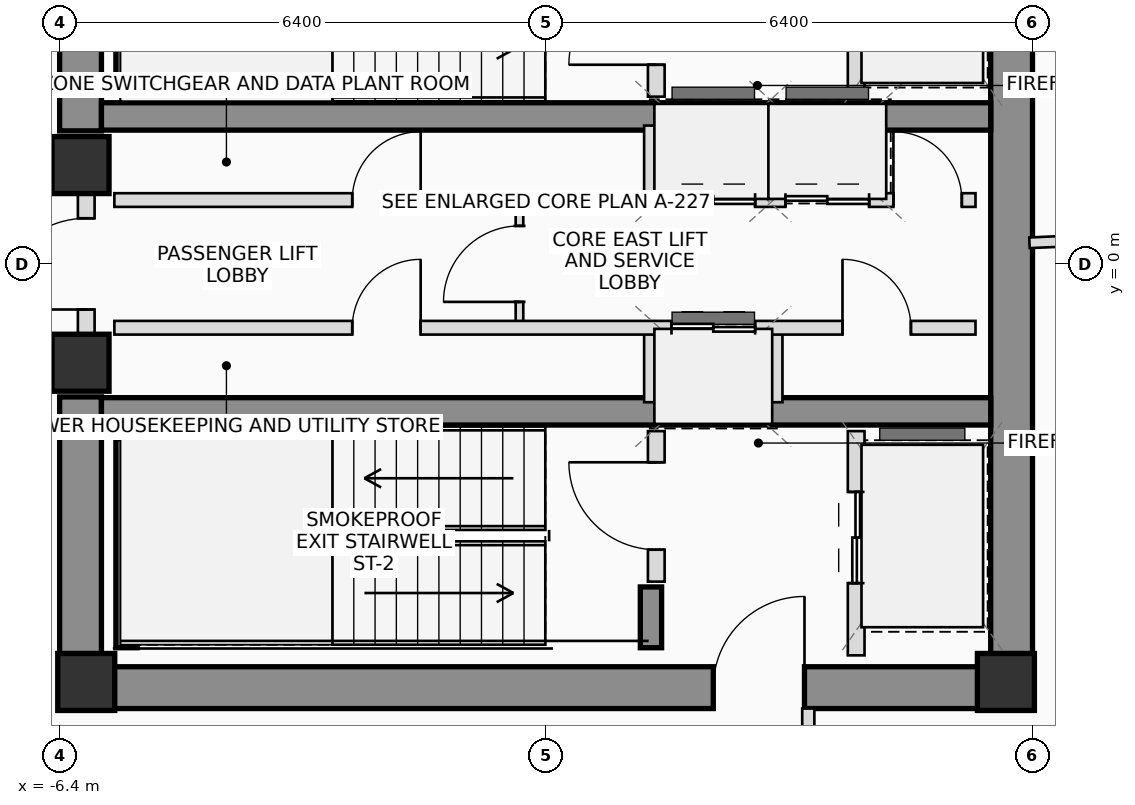
"""IFC4 building model, lengths in metres.
Left out: names, types, materials, properties, quantities, classifications, styles, units other than length and angle.
Written with IfcOpenShell. Run it as: python <this file> out.ifc"""

import sys

from ifc_helpers import new_model, si_unit, direction, frame, frame_2d, origin, origin_2d, place, context, subcontext, project, spatial, rectangle, extrude, source, transform, mapped, element, fill, save


model = new_model("IFC4")
c1 = context("Model", 3, precision=1e-05, world=origin(), true_north=direction((0.0, 1.0)))
c2 = subcontext(c1, "Body", "Model", "MODEL_VIEW")
j1 = project(units=[si_unit("LENGTHUNIT", "METRE"), si_unit("PLANEANGLEUNIT", "RADIAN")], contexts=[c1])
p1 = place(None, origin())
s1 = spatial("IfcSite", under=j1, at=p1, CompositionType="ELEMENT")
p2 = place(p1, origin())
s2 = spatial("IfcBuilding", under=s1, at=p2, CompositionType="ELEMENT")
p3 = place(p2, frame((0.0, 0.0, 300.2)))
s3 = spatial("IfcBuildingStorey", under=s2, at=p3, CompositionType="ELEMENT", Elevation=300.2)
m1 = source(origin(), c2, "Body", "SweptSolid", [
    extrude(rectangle(XDim=0.75, YDim=0.75, at=origin_2d()), origin(), (0.0, 0.0, 1.0), 3.45),
])
for number, where, z_axis, x_axis in (
    (1, (-6.05, -5.5, 0.0), (0.0, 0.0, 1.0), (1.0, 0.0, 0.0)),
    (2, (6.05, -5.5, 0.0), (0.0, 0.0, 1.0), (1.0, 0.0, 0.0)),
):
    element("IfcColumn", number, at=place(p3, frame(where, z_axis=z_axis, x_axis=x_axis)), inside=s3, PredefinedType="COLUMN", context=c2, shape_type="MappedRepresentation", body=[
        mapped(m1, transform((0.0, 0.0, 0.0), scale=1.0)),
    ])
p4 = place(p3, frame((-6.4, -5.575, 0.0), z_axis=(0.0, 0.0, 1.0), x_axis=(1.0, 0.0, 0.0)))
e3 = element("IfcWall", 3, at=p4, inside=s3, PredefinedType="SHEAR", context=c2, shape_type="SweptSolid", body=[
    extrude(rectangle(XDim=12.8, YDim=0.55, at=frame_2d((6.4, 0.0))), origin(), (0.0, 0.0, 1.0), 3.45),
])
p5 = place(p4, frame((8.6, 0.0, 0.0)))
e4 = element("IfcOpeningElement", 4, at=p5, cuts=e3, PredefinedType="OPENING", context=c2, shape_type="SweptSolid", body=[
    extrude(rectangle(XDim=1.2, YDim=2.2, at=frame_2d((0.6, 1.1))), frame((0.0, 0.285, 0.0), z_axis=(0.0, -1.0, 0.0), x_axis=(1.0, 0.0, 0.0)), (0.0, 0.0, 1.0), 0.57),
])
p6 = place(p3, frame((6.125, -5.3, 0.0), z_axis=(0.0, 0.0, 1.0), x_axis=(0.0, 1.0, 0.0)))
e5 = element("IfcWall", 5, at=p6, inside=s3, PredefinedType="SHEAR", context=c2, shape_type="SweptSolid", body=[
    extrude(rectangle(XDim=10.6, YDim=0.55, at=frame_2d((5.3, 0.0))), origin(), (0.0, 0.0, 1.0), 3.45),
])
for number, where, z_axis, x_axis in (
    (6, (-6.125, -5.3, 0.0), (0.0, 0.0, 1.0), (0.0, 1.0, 0.0)),
    (7, (-6.125, 1.75, 0.0), (0.0, 0.0, 1.0), (0.0, 1.0, 0.0)),
):
    element("IfcWall", number, at=place(p3, frame(where, z_axis=z_axis, x_axis=x_axis)), inside=s3, PredefinedType="SHEAR", context=c2, shape_type="SweptSolid", body=[
        extrude(rectangle(XDim=3.55, YDim=0.55, at=frame_2d((1.775, 0.0))), origin(), (0.0, 0.0, 1.0), 3.45),
    ])
for number, where, z_axis, x_axis in (
    (8, (-5.85, 1.94, 0.0), (0.0, 0.0, 1.0), (1.0, 0.0, 0.0)),
    (9, (-5.85, -1.94, 0.0), (0.0, 0.0, 1.0), (1.0, 0.0, 0.0)),
):
    element("IfcWall", number, at=place(p3, frame(where, z_axis=z_axis, x_axis=x_axis)), inside=s3, PredefinedType="SHEAR", context=c2, shape_type="SweptSolid", body=[
        extrude(rectangle(XDim=11.7, YDim=0.36, at=frame_2d((5.85, 0.0))), origin(), (0.0, 0.0, 1.0), 3.45),
    ])
for number, where, z_axis, x_axis in (
    (10, (-5.52, 2.3, 0.0), (0.0, 0.0, 1.0), (0.0, 1.0, 0.0)),
    (11, (-5.52, -5.05, 0.0), (0.0, 0.0, 1.0), (0.0, 1.0, 0.0)),
):
    element("IfcWall", number, at=place(p3, frame(where, z_axis=z_axis, x_axis=x_axis)), inside=s3, PredefinedType="SHEAR", context=c2, shape_type="SweptSolid", body=[
        extrude(rectangle(XDim=2.75, YDim=0.28, at=frame_2d((1.375, 0.0))), origin(), (0.0, 0.0, 1.0), 3.45),
    ])
p7 = place(p3, frame((1.38, -5.05, 0.0), z_axis=(0.0, 0.0, 1.0), x_axis=(0.0, 1.0, 0.0)))
e12 = element("IfcWall", 12, at=p7, inside=s3, PredefinedType="SHEAR", context=c2, shape_type="SweptSolid", body=[
    extrude(rectangle(XDim=0.8, YDim=0.28, at=frame_2d((0.4, 0.0))), origin(), (0.0, 0.0, 1.0), 3.45),
])
for number, where, z_axis, x_axis in (
    (13, (-6.125, -1.3, 0.0), (0.0, 0.0, 1.0), (1.0, 0.0, 0.0)),
    (14, (-6.125, 1.3, 0.0), (0.0, 0.0, 1.0), (1.0, 0.0, 0.0)),
):
    element("IfcColumn", number, at=place(p3, frame(where, z_axis=z_axis, x_axis=x_axis)), inside=s3, PredefinedType="COLUMN", context=c2, shape_type="MappedRepresentation", body=[
        mapped(m1, transform((0.0, 0.0, 0.0), scale=1.0)),
    ])
p8 = place(p3, frame((-6.05, -0.95, 0.0), z_axis=(0.0, 0.0, 1.0), x_axis=(0.0, 1.0, 0.0)))
e15 = element("IfcWall", 15, at=p8, inside=s3, PredefinedType="PLUMBINGWALL", context=c2, shape_type="SweptSolid", body=[
    extrude(rectangle(XDim=1.9, YDim=0.22, at=frame_2d((0.95, 0.0))), origin(), (0.0, 0.0, 1.0), 2.23),
])
p9 = place(p8, frame((0.35, 0.0, 0.0)))
e16 = element("IfcOpeningElement", 16, at=p9, cuts=e15, PredefinedType="OPENING", context=c2, shape_type="SweptSolid", body=[
    extrude(rectangle(XDim=1.2, YDim=2.2, at=frame_2d((0.6, 1.1))), frame((0.0, 0.12, 0.0), z_axis=(0.0, -1.0, 0.0), x_axis=(1.0, 0.0, 0.0)), (0.0, 0.0, 1.0), 0.24),
])
p10 = place(p3, frame((1.45, 2.2, 0.0), z_axis=(0.0, 0.0, 1.0), x_axis=(0.0, 1.0, 0.0)))
e17 = element("IfcWall", 17, at=p10, inside=s3, PredefinedType="PLUMBINGWALL", context=c2, shape_type="SweptSolid", body=[
    extrude(rectangle(XDim=1.98, YDim=0.22, at=frame_2d((0.99, 0.0))), origin(), (0.0, 0.0, 1.0), 3.25),
])
p11 = place(p10, frame((0.42, 0.0, 0.0)))
e18 = element("IfcOpeningElement", 18, at=p11, cuts=e17, PredefinedType="OPENING", context=c2, shape_type="SweptSolid", body=[
    extrude(rectangle(XDim=1.15, YDim=2.15, at=frame_2d((0.575, 1.075))), frame((0.0, 0.12, 0.0), z_axis=(0.0, -1.0, 0.0), x_axis=(1.0, 0.0, 0.0)), (0.0, 0.0, 1.0), 0.24),
])
p12 = place(p3, frame((4.08, 2.2, 0.0), z_axis=(0.0, 0.0, 1.0), x_axis=(0.0, 1.0, 0.0)))
e19 = element("IfcWall", 19, at=p12, inside=s3, PredefinedType="PLUMBINGWALL", context=c2, shape_type="SweptSolid", body=[
    extrude(rectangle(XDim=2.95, YDim=0.22, at=frame_2d((1.475, 0.0))), origin(), (0.0, 0.0, 1.0), 3.25),
])
p13 = place(p12, frame((0.75, 0.0, 0.0)))
e20 = element("IfcOpeningElement", 20, at=p13, cuts=e19, PredefinedType="OPENING", context=c2, shape_type="SweptSolid", body=[
    extrude(rectangle(XDim=1.2, YDim=2.25, at=frame_2d((0.6, 1.125))), frame((0.0, 0.12, 0.0), z_axis=(0.0, -1.0, 0.0), x_axis=(1.0, 0.0, 0.0)), (0.0, 0.0, 1.0), 0.24),
])
p14 = place(p3, frame((1.45, -4.18, 0.0), z_axis=(0.0, 0.0, 1.0), x_axis=(0.0, 1.0, 0.0)))
e21 = element("IfcWall", 21, at=p14, inside=s3, PredefinedType="PLUMBINGWALL", context=c2, shape_type="SweptSolid", body=[
    extrude(rectangle(XDim=1.98, YDim=0.22, at=frame_2d((0.99, 0.0))), origin(), (0.0, 0.0, 1.0), 3.25),
])
p15 = place(p14, frame((0.42, 0.0, 0.0)))
e22 = element("IfcOpeningElement", 22, at=p15, cuts=e21, PredefinedType="OPENING", context=c2, shape_type="SweptSolid", body=[
    extrude(rectangle(XDim=1.15, YDim=2.15, at=frame_2d((0.575, 1.075))), frame((0.0, 0.12, 0.0), z_axis=(0.0, -1.0, 0.0), x_axis=(1.0, 0.0, 0.0)), (0.0, 0.0, 1.0), 0.24),
])
p16 = place(p3, frame((4.08, -5.15, 0.0), z_axis=(0.0, 0.0, 1.0), x_axis=(0.0, 1.0, 0.0)))
e23 = element("IfcWall", 23, at=p16, inside=s3, PredefinedType="PLUMBINGWALL", context=c2, shape_type="SweptSolid", body=[
    extrude(rectangle(XDim=2.95, YDim=0.22, at=frame_2d((1.475, 0.0))), origin(), (0.0, 0.0, 1.0), 3.25),
])
p17 = place(p16, frame((0.95, 0.0, 0.0)))
e24 = element("IfcOpeningElement", 24, at=p17, cuts=e23, PredefinedType="OPENING", context=c2, shape_type="SweptSolid", body=[
    extrude(rectangle(XDim=1.2, YDim=2.25, at=frame_2d((0.6, 1.125))), frame((0.0, 0.12, 0.0), z_axis=(0.0, -1.0, 0.0), x_axis=(1.0, 0.0, 0.0)), (0.0, 0.0, 1.0), 0.24),
])
p18 = place(p3, frame((-0.35, -0.84, 0.0), z_axis=(0.0, 0.0, 1.0), x_axis=(0.0, 1.0, 0.0)))
e25 = element("IfcWall", 25, at=p18, inside=s3, PredefinedType="PARTITIONING", context=c2, shape_type="SweptSolid", body=[
    extrude(rectangle(XDim=1.68, YDim=0.1, at=frame_2d((0.84, 0.0))), origin(), (0.0, 0.0, 1.0), 3.25),
])
p19 = place(p18, frame((0.34, 0.0, 0.0)))
e26 = element("IfcOpeningElement", 26, at=p19, cuts=e25, PredefinedType="OPENING", context=c2, shape_type="SweptSolid", body=[
    extrude(rectangle(XDim=1.0, YDim=2.25, at=frame_2d((0.5, 1.125))), frame((0.0, 0.06, 0.0), z_axis=(0.0, -1.0, 0.0), x_axis=(1.0, 0.0, 0.0)), (0.0, 0.0, 1.0), 0.12),
])
for number, where, z_axis, x_axis in (
    (27, (1.38, 0.84, 0.0), (0.0, 0.0, 1.0), (0.0, 1.0, 0.0)),
    (28, (1.38, -1.82, 0.0), (0.0, 0.0, 1.0), (0.0, 1.0, 0.0)),
    (29, (3.02, 0.84, 0.0), (0.0, 0.0, 1.0), (0.0, 1.0, 0.0)),
    (30, (4.38, 0.84, 0.0), (0.0, 0.0, 1.0), (0.0, 1.0, 0.0)),
    (31, (3.02, -1.82, 0.0), (0.0, 0.0, 1.0), (0.0, 1.0, 0.0)),
):
    element("IfcWall", number, at=place(p3, frame(where, z_axis=z_axis, x_axis=x_axis)), inside=s3, PredefinedType="PLUMBINGWALL", context=c2, shape_type="SweptSolid", body=[
        extrude(rectangle(XDim=0.98, YDim=0.18, at=frame_2d((0.49, 0.0))), origin(), (0.0, 0.0, 1.0), 3.25),
    ])
p20 = place(p3, frame((-5.68, 0.84, 0.0), z_axis=(0.0, 0.0, 1.0), x_axis=(1.0, 0.0, 0.0)))
e32 = element("IfcWall", 32, at=p20, inside=s3, PredefinedType="PLUMBINGWALL", context=c2, shape_type="SweptSolid", body=[
    extrude(rectangle(XDim=11.33, YDim=0.18, at=frame_2d((5.665, 0.0))), origin(), (0.0, 0.0, 1.0), 3.25),
])
p21 = place(p20, frame((3.13, 0.0, 0.0)))
e33 = element("IfcOpeningElement", 33, at=p21, cuts=e32, PredefinedType="OPENING", context=c2, shape_type="SweptSolid", body=[
    extrude(rectangle(XDim=0.9, YDim=2.05, at=frame_2d((0.45, 1.025))), frame((0.0, 0.1, 0.0), z_axis=(0.0, -1.0, 0.0), x_axis=(1.0, 0.0, 0.0)), (0.0, 0.0, 1.0), 0.2),
])
p22 = place(p20, frame((7.33, 0.0, 0.0)))
e34 = element("IfcOpeningElement", 34, at=p22, cuts=e32, PredefinedType="OPENING", context=c2, shape_type="SweptSolid", body=[
    extrude(rectangle(XDim=1.1, YDim=2.2, at=frame_2d((0.55, 1.1))), frame((0.0, 0.1, 0.0), z_axis=(0.0, -1.0, 0.0), x_axis=(1.0, 0.0, 0.0)), (0.0, 0.0, 1.0), 0.2),
])
p23 = place(p20, frame((8.83, 0.0, 0.0)))
e35 = element("IfcOpeningElement", 35, at=p23, cuts=e32, PredefinedType="OPENING", context=c2, shape_type="SweptSolid", body=[
    extrude(rectangle(XDim=1.1, YDim=2.2, at=frame_2d((0.55, 1.1))), frame((0.0, 0.1, 0.0), z_axis=(0.0, -1.0, 0.0), x_axis=(1.0, 0.0, 0.0)), (0.0, 0.0, 1.0), 0.2),
])
p24 = place(p20, frame((10.25, 0.0, 0.0)))
e36 = element("IfcOpeningElement", 36, at=p24, cuts=e32, PredefinedType="OPENING", context=c2, shape_type="SweptSolid", body=[
    extrude(rectangle(XDim=0.9, YDim=2.05, at=frame_2d((0.45, 1.025))), frame((0.0, 0.1, 0.0), z_axis=(0.0, -1.0, 0.0), x_axis=(1.0, 0.0, 0.0)), (0.0, 0.0, 1.0), 0.2),
])
p25 = place(p3, frame((-5.68, -0.84, 0.0), z_axis=(0.0, 0.0, 1.0), x_axis=(1.0, 0.0, 0.0)))
e37 = element("IfcWall", 37, at=p25, inside=s3, PredefinedType="PLUMBINGWALL", context=c2, shape_type="SweptSolid", body=[
    extrude(rectangle(XDim=11.33, YDim=0.18, at=frame_2d((5.665, 0.0))), origin(), (0.0, 0.0, 1.0), 3.25),
])
p26 = place(p25, frame((3.13, 0.0, 0.0)))
e38 = element("IfcOpeningElement", 38, at=p26, cuts=e37, PredefinedType="OPENING", context=c2, shape_type="SweptSolid", body=[
    extrude(rectangle(XDim=0.9, YDim=2.05, at=frame_2d((0.45, 1.025))), frame((0.0, 0.1, 0.0), z_axis=(0.0, -1.0, 0.0), x_axis=(1.0, 0.0, 0.0)), (0.0, 0.0, 1.0), 0.2),
])
p27 = place(p25, frame((7.33, 0.0, 0.0)))
e39 = element("IfcOpeningElement", 39, at=p27, cuts=e37, PredefinedType="OPENING", context=c2, shape_type="SweptSolid", body=[
    extrude(rectangle(XDim=1.1, YDim=2.2, at=frame_2d((0.55, 1.1))), frame((0.0, 0.1, 0.0), z_axis=(0.0, -1.0, 0.0), x_axis=(1.0, 0.0, 0.0)), (0.0, 0.0, 1.0), 0.2),
])
p28 = place(p25, frame((9.58, 0.0, 0.0)))
e40 = element("IfcOpeningElement", 40, at=p28, cuts=e37, PredefinedType="OPENING", context=c2, shape_type="SweptSolid", body=[
    extrude(rectangle(XDim=0.9, YDim=2.05, at=frame_2d((0.45, 1.025))), frame((0.0, 0.1, 0.0), z_axis=(0.0, -1.0, 0.0), x_axis=(1.0, 0.0, 0.0)), (0.0, 0.0, 1.0), 0.2),
])
p29 = place(p3, frame((3.45, -5.85, 0.0), z_axis=(0.0, 0.0, 1.0), x_axis=(0.0, -1.0, 0.0)))
e41 = element("IfcWall", 41, at=p29, inside=s3, PredefinedType="PARTITIONING", context=c2, shape_type="SweptSolid", body=[
    extrude(rectangle(XDim=1.575, YDim=0.16, at=frame_2d((0.787, 0.0))), origin(), (0.0, 0.0, 1.0), 2.855),
])
p30 = place(p29, frame((0.287, 0.0, 0.0)))
e42 = element("IfcOpeningElement", 42, at=p30, cuts=e41, PredefinedType="OPENING", context=c2, shape_type="SweptSolid", body=[
    extrude(rectangle(XDim=1.0, YDim=2.25, at=frame_2d((0.5, 1.125))), frame((0.0, 0.09, 0.0), z_axis=(0.0, -1.0, 0.0), x_axis=(1.0, 0.0, 0.0)), (0.0, 0.0, 1.0), 0.18),
])
p31 = place(p3, frame((6.36, 0.278, 0.0), z_axis=(0.0, 0.0, 1.0), x_axis=(0.999047623791, 0.043633076864, 0.0)))
e43 = element("IfcWall", 43, at=p31, inside=s3, PredefinedType="PARTITIONING", context=c2, shape_type="SweptSolid", body=[
    extrude(rectangle(XDim=13.524, YDim=0.14, at=frame_2d((6.762, 0.0))), origin(), (0.0, 0.0, 1.0), 2.815),
])
p32 = place(p5, origin())
e44 = element("IfcDoor", 44, at=p32, inside=s3, OperationType="SINGLE_SWING_RIGHT", PredefinedType="DOOR", context=c2, shape_type="SweptSolid", body=[
    extrude(rectangle(XDim=1.2, YDim=2.2, at=frame_2d((0.6, 1.1))), frame((0.0, 0.025, 0.0), z_axis=(0.0, -1.0, 0.0), x_axis=(1.0, 0.0, 0.0)), (0.0, 0.0, 1.0), 0.05),
])
fill(e4, e44)
p33 = place(p9, origin())
e45 = element("IfcDoor", 45, at=p33, inside=s3, OperationType="SINGLE_SWING_LEFT", PredefinedType="DOOR", context=c2, shape_type="SweptSolid", body=[
    extrude(rectangle(XDim=1.2, YDim=2.2, at=frame_2d((0.6, 1.1))), frame((0.0, 0.025, 0.0), z_axis=(0.0, -1.0, 0.0), x_axis=(1.0, 0.0, 0.0)), (0.0, 0.0, 1.0), 0.05),
])
fill(e16, e45)
p34 = place(p11, origin())
e46 = element("IfcDoor", 46, at=p34, inside=s3, OperationType="SINGLE_SWING_LEFT", PredefinedType="DOOR", context=c2, shape_type="SweptSolid", body=[
    extrude(rectangle(XDim=1.15, YDim=2.15, at=frame_2d((0.575, 1.075))), frame((0.0, 0.025, 0.0), z_axis=(0.0, -1.0, 0.0), x_axis=(1.0, 0.0, 0.0)), (0.0, 0.0, 1.0), 0.05),
])
fill(e18, e46)
p35 = place(p15, origin())
e47 = element("IfcDoor", 47, at=p35, inside=s3, OperationType="SINGLE_SWING_RIGHT", PredefinedType="DOOR", context=c2, shape_type="SweptSolid", body=[
    extrude(rectangle(XDim=1.15, YDim=2.15, at=frame_2d((0.575, 1.075))), frame((0.0, 0.025, 0.0), z_axis=(0.0, -1.0, 0.0), x_axis=(1.0, 0.0, 0.0)), (0.0, 0.0, 1.0), 0.05),
])
fill(e22, e47)
p36 = place(p17, origin())
e48 = element("IfcDoor", 48, at=p36, inside=s3, OperationType="DOUBLE_DOOR_SLIDING", PredefinedType="DOOR", context=c2, shape_type="SweptSolid", body=[
    extrude(rectangle(XDim=1.2, YDim=2.25, at=frame_2d((0.6, 1.125))), frame((0.0, 0.025, 0.0), z_axis=(0.0, -1.0, 0.0), x_axis=(1.0, 0.0, 0.0)), (0.0, 0.0, 1.0), 0.05),
])
fill(e24, e48)
p37 = place(p19, origin())
e49 = element("IfcDoor", 49, at=p37, inside=s3, OperationType="SINGLE_SWING_LEFT", PredefinedType="DOOR", context=c2, shape_type="SweptSolid", body=[
    extrude(rectangle(XDim=1.0, YDim=2.25, at=frame_2d((0.5, 1.125))), frame((0.0, 0.025, 0.0), z_axis=(0.0, -1.0, 0.0), x_axis=(1.0, 0.0, 0.0)), (0.0, 0.0, 1.0), 0.05),
])
fill(e26, e49)
p38 = place(p21, origin())
e50 = element("IfcDoor", 50, at=p38, inside=s3, OperationType="SINGLE_SWING_RIGHT", PredefinedType="DOOR", context=c2, shape_type="SweptSolid", body=[
    extrude(rectangle(XDim=0.9, YDim=2.05, at=frame_2d((0.45, 1.025))), frame((0.0, 0.025, 0.0), z_axis=(0.0, -1.0, 0.0), x_axis=(1.0, 0.0, 0.0)), (0.0, 0.0, 1.0), 0.05),
])
fill(e33, e50)
p39 = place(p22, origin())
e51 = element("IfcDoor", 51, at=p39, inside=s3, OperationType="DOUBLE_DOOR_SLIDING", PredefinedType="DOOR", context=c2, shape_type="SweptSolid", body=[
    extrude(rectangle(XDim=1.1, YDim=2.2, at=frame_2d((0.55, 1.1))), frame((0.0, 0.025, 0.0), z_axis=(0.0, -1.0, 0.0), x_axis=(1.0, 0.0, 0.0)), (0.0, 0.0, 1.0), 0.05),
])
fill(e34, e51)
p40 = place(p23, origin())
e52 = element("IfcDoor", 52, at=p40, inside=s3, OperationType="DOUBLE_DOOR_SLIDING", PredefinedType="DOOR", context=c2, shape_type="SweptSolid", body=[
    extrude(rectangle(XDim=1.1, YDim=2.2, at=frame_2d((0.55, 1.1))), frame((0.0, 0.025, 0.0), z_axis=(0.0, -1.0, 0.0), x_axis=(1.0, 0.0, 0.0)), (0.0, 0.0, 1.0), 0.05),
])
fill(e35, e52)
p41 = place(p24, origin())
e53 = element("IfcDoor", 53, at=p41, inside=s3, OperationType="SINGLE_SWING_LEFT", PredefinedType="DOOR", context=c2, shape_type="SweptSolid", body=[
    extrude(rectangle(XDim=0.9, YDim=2.05, at=frame_2d((0.45, 1.025))), frame((0.0, 0.025, 0.0), z_axis=(0.0, -1.0, 0.0), x_axis=(1.0, 0.0, 0.0)), (0.0, 0.0, 1.0), 0.05),
])
fill(e36, e53)
p42 = place(p26, origin())
e54 = element("IfcDoor", 54, at=p42, inside=s3, OperationType="SINGLE_SWING_RIGHT", PredefinedType="DOOR", context=c2, shape_type="SweptSolid", body=[
    extrude(rectangle(XDim=0.9, YDim=2.05, at=frame_2d((0.45, 1.025))), frame((0.0, 0.025, 0.0), z_axis=(0.0, -1.0, 0.0), x_axis=(1.0, 0.0, 0.0)), (0.0, 0.0, 1.0), 0.05),
])
fill(e38, e54)
p43 = place(p27, origin())
e55 = element("IfcDoor", 55, at=p43, inside=s3, OperationType="DOUBLE_DOOR_SLIDING", PredefinedType="DOOR", context=c2, shape_type="SweptSolid", body=[
    extrude(rectangle(XDim=1.1, YDim=2.2, at=frame_2d((0.55, 1.1))), frame((0.0, 0.025, 0.0), z_axis=(0.0, -1.0, 0.0), x_axis=(1.0, 0.0, 0.0)), (0.0, 0.0, 1.0), 0.05),
])
fill(e39, e55)
p44 = place(p28, origin())
e56 = element("IfcDoor", 56, at=p44, inside=s3, OperationType="SINGLE_SWING_LEFT", PredefinedType="DOOR", context=c2, shape_type="SweptSolid", body=[
    extrude(rectangle(XDim=0.9, YDim=2.05, at=frame_2d((0.45, 1.025))), frame((0.0, 0.025, 0.0), z_axis=(0.0, -1.0, 0.0), x_axis=(1.0, 0.0, 0.0)), (0.0, 0.0, 1.0), 0.05),
])
fill(e40, e56)
save(model, sys.argv[1])
